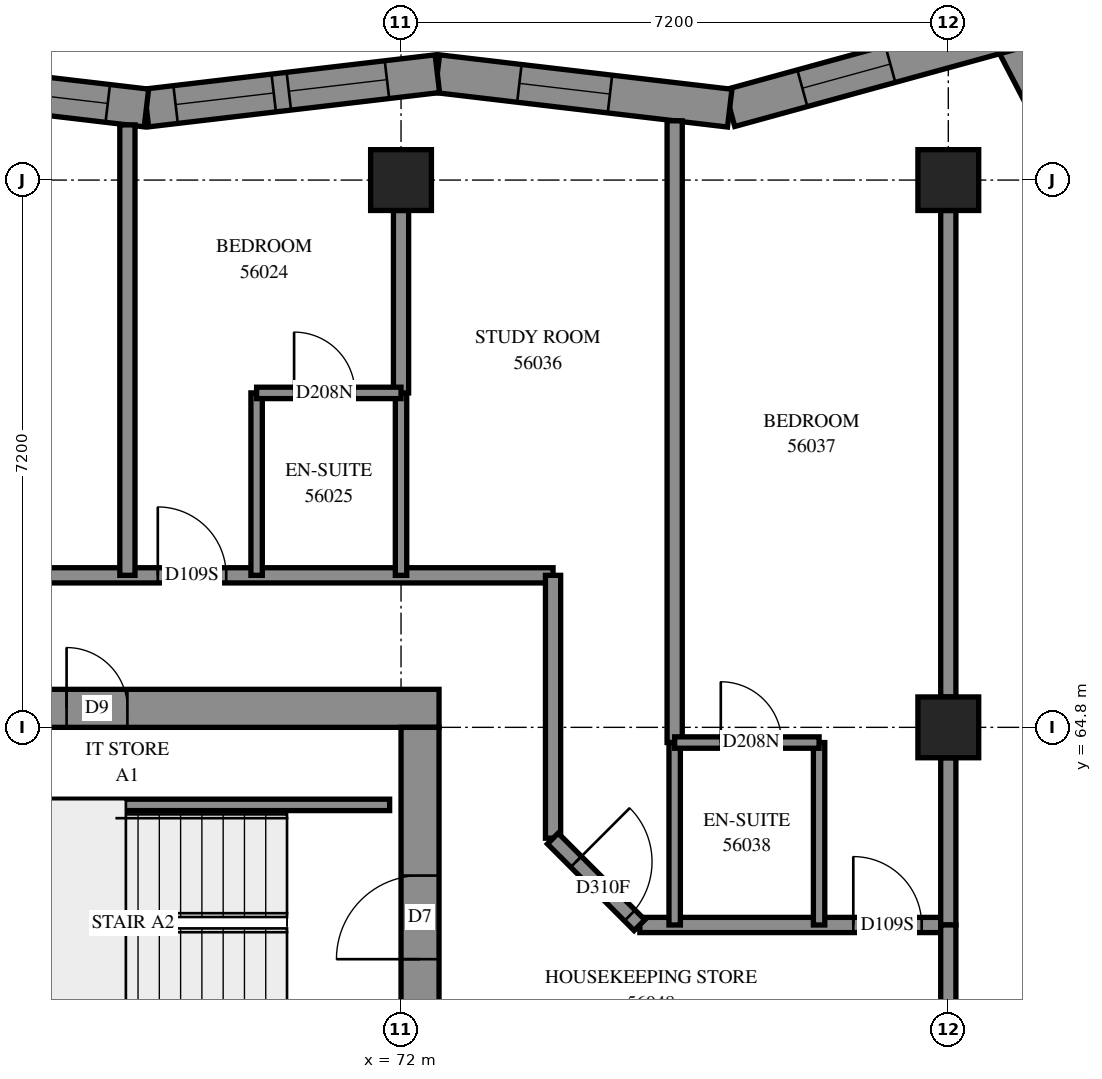
"""IFC4 building model, lengths in metres.
Left out: names, types, materials, properties, quantities, classifications, styles, units other than length and angle.
Written with IfcOpenShell. Run it as: python <this file> out.ifc"""

import sys

from ifc_helpers import new_model, si_unit, direction, frame, frame_2d, origin, origin_2d, place, context, subcontext, project, spatial, polyline, rectangle, outline, extrude, element, fill, save


model = new_model("IFC4")
c1 = context("Model", 3, precision=1e-05, world=origin(), true_north=direction((0.0, 1.0)))
c2 = subcontext(c1, "Body", "Model", "MODEL_VIEW")
j1 = project(units=[si_unit("LENGTHUNIT", "METRE"), si_unit("PLANEANGLEUNIT", "RADIAN")], contexts=[c1])
p1 = place(None, origin())
s1 = spatial("IfcSite", under=j1, at=p1, CompositionType="ELEMENT")
p2 = place(p1, origin())
s2 = spatial("IfcBuilding", under=s1, at=p2, CompositionType="ELEMENT")
p3 = place(p2, frame((0.0, 0.0, 206.6)))
s3 = spatial("IfcBuildingStorey", under=s2, at=p3, CompositionType="ELEMENT", Elevation=206.6)
for number, where, z_axis, x_axis in (
    (1, (72.0, 72.0, 0.0), (0.0, 0.0, 1.0), (1.0, 0.0, 0.0)),
    (2, (79.2, 64.8, 0.0), (0.0, 0.0, 1.0), (1.0, 0.0, 0.0)),
    (3, (79.2, 72.0, 0.0), (0.0, 0.0, 1.0), (1.0, 0.0, 0.0)),
):
    element("IfcColumn", number, at=place(p3, frame(where, z_axis=z_axis, x_axis=x_axis)), inside=s3, PredefinedType="COLUMN", context=c2, shape_type="SweptSolid", body=[
        extrude(rectangle(XDim=0.8, YDim=0.8, at=origin_2d()), origin(), (0.0, 0.0, 1.0), 3.1),
    ])
p4 = place(p3, frame((57.1, 65.05, -0.3), z_axis=(0.0, 0.0, 1.0), x_axis=(1.0, 0.0, 0.0)))
e4 = element("IfcWall", 4, at=p4, inside=s3, PredefinedType="SHEAR", context=c2, shape_type="SweptSolid", body=[
    extrude(rectangle(XDim=15.4, YDim=0.5, at=frame_2d((7.7, 0.0))), origin(), (0.0, 0.0, 1.0), 2.7),
])
p5 = place(p4, frame((10.5, 0.0, 0.3)))
e5 = element("IfcOpeningElement", 5, at=p5, cuts=e4, PredefinedType="OPENING", context=c2, shape_type="SweptSolid", body=[
    extrude(rectangle(XDim=0.8, YDim=2.1, at=frame_2d((0.4, 1.05))), frame((0.0, 0.26, 0.0), z_axis=(0.0, -1.0, 0.0), x_axis=(1.0, 0.0, 0.0)), (0.0, 0.0, 1.0), 0.52),
])
p6 = place(p3, frame((72.25, 50.4, -0.3), z_axis=(0.0, 0.0, 1.0), x_axis=(0.0, 1.0, 0.0)))
e6 = element("IfcWall", 6, at=p6, inside=s3, PredefinedType="SHEAR", context=c2, shape_type="SweptSolid", body=[
    extrude(rectangle(XDim=14.4, YDim=0.5, at=frame_2d((7.2, 0.0))), origin(), (0.0, 0.0, 1.0), 2.7),
])
p7 = place(p6, frame((4.55, 0.0, 0.3)))
e7 = element("IfcOpeningElement", 7, at=p7, cuts=e6, PredefinedType="OPENING", context=c2, shape_type="SweptSolid", body=[
    extrude(rectangle(XDim=1.1, YDim=2.1, at=frame_2d((0.55, 1.05))), frame((0.0, 0.26, 0.0), z_axis=(0.0, -1.0, 0.0), x_axis=(1.0, 0.0, 0.0)), (0.0, 0.0, 1.0), 0.52),
])
p8 = place(p6, frame((11.35, 0.0, 0.3)))
e8 = element("IfcOpeningElement", 8, at=p8, cuts=e6, PredefinedType="OPENING", context=c2, shape_type="SweptSolid", body=[
    extrude(rectangle(XDim=1.1, YDim=2.1, at=frame_2d((0.55, 1.05))), frame((0.0, 0.26, 0.0), z_axis=(0.0, -1.0, 0.0), x_axis=(1.0, 0.0, 0.0)), (0.0, 0.0, 1.0), 0.52),
])
p9 = place(p3, frame((81.55, 70.986, 0.0), z_axis=(0.0, 0.0, 1.0), x_axis=(-0.4617494401, 0.8870104027, 0.0)))
e9 = element("IfcWall", 9, at=p9, inside=s3, PredefinedType="SOLIDWALL", context=c2, shape_type="SweptSolid", body=[
    extrude(outline(polyline([(0.056, -0.25), (3.551, -0.25), (3.147, 0.25), (-0.056, 0.25), (0.056, -0.25)])), origin(), (0.0, 0.0, 1.0), 3.1),
])
p10 = place(p9, frame((0.747, 0.0, 0.45)))
e10 = element("IfcOpeningElement", 10, at=p10, cuts=e9, PredefinedType="OPENING", context=c2, shape_type="SweptSolid", body=[
    extrude(rectangle(XDim=1.2, YDim=2.5, at=frame_2d((0.6, 1.25))), frame((0.0, 0.26, 0.0), z_axis=(0.0, -1.0, 0.0), x_axis=(1.0, 0.0, 0.0)), (0.0, 0.0, 1.0), 0.52),
])
p11 = place(p3, frame((80.004, 73.957, 0.0), z_axis=(0.0, 0.0, 1.0), x_axis=(-0.9643003028, -0.2648111139, 0.0)))
e11 = element("IfcWall", 11, at=p11, inside=s3, PredefinedType="SOLIDWALL", context=c2, shape_type="SweptSolid", body=[
    extrude(outline(polyline([(-0.202, -0.25), (3.767, -0.25), (3.865, 0.25), (0.202, 0.25), (-0.202, -0.25)])), origin(), (0.0, 0.0, 1.0), 3.1),
])
p12 = place(p11, frame((1.625, 0.0, 0.45)))
e12 = element("IfcOpeningElement", 12, at=p12, cuts=e11, PredefinedType="OPENING", context=c2, shape_type="SweptSolid", body=[
    extrude(rectangle(XDim=1.2, YDim=2.5, at=frame_2d((0.6, 1.25))), frame((0.0, 0.26, 0.0), z_axis=(0.0, -1.0, 0.0), x_axis=(1.0, 0.0, 0.0)), (0.0, 0.0, 1.0), 0.52),
])
p13 = place(p3, frame((76.324, 72.946, 0.0), z_axis=(0.0, 0.0, 1.0), x_axis=(-0.9931274976, 0.1170374872, 0.0)))
e13 = element("IfcWall", 13, at=p13, inside=s3, PredefinedType="SOLIDWALL", context=c2, shape_type="SweptSolid", body=[
    extrude(outline(polyline([(0.049, -0.25), (3.903, -0.25), (3.844, 0.25), (-0.049, 0.25), (0.049, -0.25)])), origin(), (0.0, 0.0, 1.0), 3.1),
])
p14 = place(p13, frame((1.587, 0.0, 0.45)))
e14 = element("IfcOpeningElement", 14, at=p14, cuts=e13, PredefinedType="OPENING", context=c2, shape_type="SweptSolid", body=[
    extrude(rectangle(XDim=1.2, YDim=2.5, at=frame_2d((0.6, 1.25))), frame((0.0, 0.26, 0.0), z_axis=(0.0, -1.0, 0.0), x_axis=(1.0, 0.0, 0.0)), (0.0, 0.0, 1.0), 0.52),
])
p15 = place(p3, frame((72.478, 73.399, 0.0), z_axis=(0.0, 0.0, 1.0), x_axis=(-0.9931289789, -0.1170249176, 0.0)))
e15 = element("IfcWall", 15, at=p15, inside=s3, PredefinedType="SOLIDWALL", context=c2, shape_type="SweptSolid", body=[
    extrude(outline(polyline([(-0.029, -0.25), (3.824, -0.25), (3.883, 0.25), (0.029, 0.25), (-0.029, -0.25)])), origin(), (0.0, 0.0, 1.0), 3.1),
])
p16 = place(p15, frame((0.667, 0.0, 0.45)))
e16 = element("IfcOpeningElement", 16, at=p16, cuts=e15, PredefinedType="OPENING", context=c2, shape_type="SweptSolid", body=[
    extrude(rectangle(XDim=1.3, YDim=2.5, at=frame_2d((0.65, 1.25))), frame((0.0, 0.26, 0.0), z_axis=(0.0, -1.0, 0.0), x_axis=(1.0, 0.0, 0.0)), (0.0, 0.0, 1.0), 0.52),
])
p17 = place(p15, frame((2.167, 0.0, 0.45)))
e17 = element("IfcOpeningElement", 17, at=p17, cuts=e15, PredefinedType="OPENING", context=c2, shape_type="SweptSolid", body=[
    extrude(rectangle(XDim=1.3, YDim=2.5, at=frame_2d((0.65, 1.25))), frame((0.0, 0.26, 0.0), z_axis=(0.0, -1.0, 0.0), x_axis=(1.0, 0.0, 0.0)), (0.0, 0.0, 1.0), 0.52),
])
p18 = place(p3, frame((68.65, 72.948, 0.0), z_axis=(0.0, 0.0, 1.0), x_axis=(-0.9931289789, 0.1170249176, 0.0)))
e18 = element("IfcWall", 18, at=p18, inside=s3, PredefinedType="SOLIDWALL", context=c2, shape_type="SweptSolid", body=[
    extrude(outline(polyline([(0.029, -0.25), (3.883, -0.25), (3.824, 0.25), (-0.029, 0.25), (0.029, -0.25)])), origin(), (0.0, 0.0, 1.0), 3.1),
])
p19 = place(p18, frame((0.512, 0.0, 0.45)))
e19 = element("IfcOpeningElement", 19, at=p19, cuts=e18, PredefinedType="OPENING", context=c2, shape_type="SweptSolid", body=[
    extrude(rectangle(XDim=1.3, YDim=2.5, at=frame_2d((0.65, 1.25))), frame((0.0, 0.26, 0.0), z_axis=(0.0, -1.0, 0.0), x_axis=(1.0, 0.0, 0.0)), (0.0, 0.0, 1.0), 0.52),
])
p20 = place(p18, frame((2.012, 0.0, 0.45)))
e20 = element("IfcOpeningElement", 20, at=p20, cuts=e18, PredefinedType="OPENING", context=c2, shape_type="SweptSolid", body=[
    extrude(rectangle(XDim=1.3, YDim=2.5, at=frame_2d((0.65, 1.25))), frame((0.0, 0.26, 0.0), z_axis=(0.0, -1.0, 0.0), x_axis=(1.0, 0.0, 0.0)), (0.0, 0.0, 1.0), 0.52),
])
p21 = place(p3, frame((64.95, 63.78, 0.0), z_axis=(0.0, 0.0, 1.0), x_axis=(1.0, 0.0, 0.0)))
e21 = element("IfcWall", 21, at=p21, inside=s3, PredefinedType="PARTITIONING", context=c2, shape_type="SweptSolid", body=[
    extrude(rectangle(XDim=6.9, YDim=0.15, at=frame_2d((3.45, 0.0))), origin(), (0.0, 0.0, 1.0), 3.1),
])
p22 = place(p3, frame((55.6, 66.8, 0.0), z_axis=(0.0, 0.0, 1.0), x_axis=(1.0, 0.0, 0.0)))
e22 = element("IfcWall", 22, at=p22, inside=s3, PredefinedType="PARTITIONING", context=c2, shape_type="SweptSolid", body=[
    extrude(rectangle(XDim=18.4, YDim=0.2, at=frame_2d((9.2, 0.0))), origin(), (0.0, 0.0, 1.0), 3.1),
])
p23 = place(p22, frame((4.25, 0.0, 0.0)))
e23 = element("IfcOpeningElement", 23, at=p23, cuts=e22, PredefinedType="OPENING", context=c2, shape_type="SweptSolid", body=[
    extrude(rectangle(XDim=0.9, YDim=2.1, at=frame_2d((0.45, 1.05))), frame((0.0, 0.11, 0.0), z_axis=(0.0, -1.0, 0.0), x_axis=(1.0, 0.0, 0.0)), (0.0, 0.0, 1.0), 0.22),
])
p24 = place(p22, frame((7.974, 0.0, 0.0)))
e24 = element("IfcOpeningElement", 24, at=p24, cuts=e22, PredefinedType="OPENING", context=c2, shape_type="SweptSolid", body=[
    extrude(rectangle(XDim=1.0, YDim=2.1, at=frame_2d((0.5, 1.05))), frame((0.0, 0.11, 0.0), z_axis=(0.0, -1.0, 0.0), x_axis=(1.0, 0.0, 0.0)), (0.0, 0.0, 1.0), 0.22),
])
p25 = place(p22, frame((13.2, 0.0, 0.0)))
e25 = element("IfcOpeningElement", 25, at=p25, cuts=e22, PredefinedType="OPENING", context=c2, shape_type="SweptSolid", body=[
    extrude(rectangle(XDim=0.9, YDim=2.1, at=frame_2d((0.45, 1.05))), frame((0.0, 0.11, 0.0), z_axis=(0.0, -1.0, 0.0), x_axis=(1.0, 0.0, 0.0)), (0.0, 0.0, 1.0), 0.22),
])
p26 = place(p3, frame((75.6, 64.6, 0.0), z_axis=(0.0, 0.0, 1.0), x_axis=(0.0, 1.0, 0.0)))
e26 = element("IfcWall", 26, at=p26, inside=s3, PredefinedType="PARTITIONING", context=c2, shape_type="SweptSolid", body=[
    extrude(rectangle(XDim=8.18, YDim=0.2, at=frame_2d((4.09, 0.0))), origin(), (0.0, 0.0, 1.0), 3.1),
])
p27 = place(p3, frame((79.2, 65.2, 0.0), z_axis=(0.0, 0.0, 1.0), x_axis=(0.0, 1.0, 0.0)))
e27 = element("IfcWall", 27, at=p27, inside=s3, PredefinedType="PARTITIONING", context=c2, shape_type="SweptSolid", body=[
    extrude(rectangle(XDim=6.4, YDim=0.2, at=frame_2d((3.2, 0.0))), origin(), (0.0, 0.0, 1.0), 3.1),
])
p28 = place(p3, frame((68.4, 66.8, 0.0), z_axis=(0.0, 0.0, 1.0), x_axis=(0.0, 1.0, 0.0)))
e28 = element("IfcWall", 28, at=p28, inside=s3, PredefinedType="PARTITIONING", context=c2, shape_type="SweptSolid", body=[
    extrude(rectangle(XDim=5.926, YDim=0.2, at=frame_2d((2.963, 0.0))), origin(), (0.0, 0.0, 1.0), 3.1),
])
p29 = place(p3, frame((75.142, 62.2, 0.0), z_axis=(0.0, 0.0, 1.0), x_axis=(1.0, 0.0, 0.0)))
e29 = element("IfcWall", 29, at=p29, inside=s3, PredefinedType="PARTITIONING", context=c2, shape_type="SweptSolid", body=[
    extrude(rectangle(XDim=4.058, YDim=0.2, at=frame_2d((2.029, 0.0))), origin(), (0.0, 0.0, 1.0), 3.1),
])
p30 = place(p29, frame((2.808, 0.0, 0.0)))
e30 = element("IfcOpeningElement", 30, at=p30, cuts=e29, PredefinedType="OPENING", context=c2, shape_type="SweptSolid", body=[
    extrude(rectangle(XDim=0.9, YDim=2.1, at=frame_2d((0.45, 1.05))), frame((0.0, 0.11, 0.0), z_axis=(0.0, -1.0, 0.0), x_axis=(1.0, 0.0, 0.0)), (0.0, 0.0, 1.0), 0.22),
])
p31 = place(p3, frame((74.0, 63.342, 0.0), z_axis=(0.0, 0.0, 1.0), x_axis=(0.0, 1.0, 0.0)))
e31 = element("IfcWall", 31, at=p31, inside=s3, PredefinedType="PARTITIONING", context=c2, shape_type="SweptSolid", body=[
    extrude(rectangle(XDim=3.458, YDim=0.2, at=frame_2d((1.729, 0.0))), origin(), (0.0, 0.0, 1.0), 3.1),
])
for number, where, z_axis, x_axis in (
    (32, (70.1, 66.8, 0.0), (0.0, 0.0, 1.0), (0.0, 1.0, 0.0)),
    (33, (72.0, 66.8, 0.0), (0.0, 0.0, 1.0), (0.0, 1.0, 0.0)),
):
    element("IfcWall", number, at=place(p3, frame(where, z_axis=z_axis, x_axis=x_axis)), inside=s3, PredefinedType="PARTITIONING", context=c2, shape_type="SweptSolid", body=[
        extrude(rectangle(XDim=2.4, YDim=0.15, at=frame_2d((1.2, 0.0))), origin(), (0.0, 0.0, 1.0), 3.1),
    ])
p32 = place(p3, frame((72.0, 69.2, 0.0), z_axis=(0.0, 0.0, 1.0), x_axis=(0.0, 1.0, 0.0)))
e34 = element("IfcWall", 34, at=p32, inside=s3, PredefinedType="PARTITIONING", context=c2, shape_type="SweptSolid", body=[
    extrude(rectangle(XDim=2.4, YDim=0.2, at=frame_2d((1.2, 0.0))), origin(), (0.0, 0.0, 1.0), 3.1),
])
for number, where, z_axis, x_axis in (
    (35, (75.6, 62.2, 0.0), (0.0, 0.0, 1.0), (0.0, 1.0, 0.0)),
    (36, (77.5, 62.2, 0.0), (0.0, 0.0, 1.0), (0.0, 1.0, 0.0)),
):
    element("IfcWall", number, at=place(p3, frame(where, z_axis=z_axis, x_axis=x_axis)), inside=s3, PredefinedType="PARTITIONING", context=c2, shape_type="SweptSolid", body=[
        extrude(rectangle(XDim=2.4, YDim=0.15, at=frame_2d((1.2, 0.0))), origin(), (0.0, 0.0, 1.0), 3.1),
    ])
p33 = place(p3, frame((79.2, 62.2, 0.0), z_axis=(0.0, 0.0, 1.0), x_axis=(0.0, 1.0, 0.0)))
e37 = element("IfcWall", 37, at=p33, inside=s3, PredefinedType="PARTITIONING", context=c2, shape_type="SweptSolid", body=[
    extrude(rectangle(XDim=2.2, YDim=0.2, at=frame_2d((1.1, 0.0))), origin(), (0.0, 0.0, 1.0), 3.1),
])
p34 = place(p3, frame((79.2, 60.2, 0.0), z_axis=(0.0, 0.0, 1.0), x_axis=(0.0, 1.0, 0.0)))
e38 = element("IfcWall", 38, at=p34, inside=s3, PredefinedType="PARTITIONING", context=c2, shape_type="SweptSolid", body=[
    extrude(rectangle(XDim=2.0, YDim=0.2, at=frame_2d((1.0, 0.0))), origin(), (0.0, 0.0, 1.0), 3.1),
])
p35 = place(p3, frame((75.6, 64.6, 0.0), z_axis=(0.0, 0.0, 1.0), x_axis=(1.0, 0.0, 0.0)))
e39 = element("IfcWall", 39, at=p35, inside=s3, PredefinedType="PARTITIONING", context=c2, shape_type="SweptSolid", body=[
    extrude(rectangle(XDim=1.9, YDim=0.15, at=frame_2d((0.95, 0.0))), origin(), (0.0, 0.0, 1.0), 3.1),
])
p36 = place(p35, frame((0.607, 0.0, 0.0)))
e40 = element("IfcOpeningElement", 40, at=p36, cuts=e39, PredefinedType="OPENING", context=c2, shape_type="SweptSolid", body=[
    extrude(rectangle(XDim=0.8, YDim=2.1, at=frame_2d((0.4, 1.05))), frame((0.0, 0.085, 0.0), z_axis=(0.0, -1.0, 0.0), x_axis=(1.0, 0.0, 0.0)), (0.0, 0.0, 1.0), 0.17),
])
p37 = place(p3, frame((70.1, 69.2, 0.0), z_axis=(0.0, 0.0, 1.0), x_axis=(1.0, 0.0, 0.0)))
e41 = element("IfcWall", 41, at=p37, inside=s3, PredefinedType="PARTITIONING", context=c2, shape_type="SweptSolid", body=[
    extrude(rectangle(XDim=1.9, YDim=0.15, at=frame_2d((0.95, 0.0))), origin(), (0.0, 0.0, 1.0), 3.1),
])
p38 = place(p37, frame((0.493, 0.0, 0.0)))
e42 = element("IfcOpeningElement", 42, at=p38, cuts=e41, PredefinedType="OPENING", context=c2, shape_type="SweptSolid", body=[
    extrude(rectangle(XDim=0.8, YDim=2.1, at=frame_2d((0.4, 1.05))), frame((0.0, 0.085, 0.0), z_axis=(0.0, -1.0, 0.0), x_axis=(1.0, 0.0, 0.0)), (0.0, 0.0, 1.0), 0.17),
])
p39 = place(p3, frame((73.997, 63.337, 0.0), z_axis=(0.0, 0.0, 1.0), x_axis=(0.7071067812, -0.7071067812, 0.0)))
e43 = element("IfcWall", 43, at=p39, inside=s3, PredefinedType="PARTITIONING", context=c2, shape_type="SweptSolid", body=[
    extrude(rectangle(XDim=1.612, YDim=0.2, at=frame_2d((0.806, 0.0))), origin(), (0.0, 0.0, 1.0), 3.1),
])
p40 = place(p39, frame((0.432, 0.0, 0.0)))
e44 = element("IfcOpeningElement", 44, at=p40, cuts=e43, PredefinedType="OPENING", context=c2, shape_type="SweptSolid", body=[
    extrude(rectangle(XDim=1.0, YDim=2.1, at=frame_2d((0.5, 1.05))), frame((0.0, 0.11, 0.0), z_axis=(0.0, -1.0, 0.0), x_axis=(1.0, 0.0, 0.0)), (0.0, 0.0, 1.0), 0.22),
])
p41 = place(p12, origin())
e45 = element("IfcWindow", 45, at=p41, inside=s3, PartitioningType="SINGLE_PANEL", PredefinedType="WINDOW", context=c2, shape_type="SweptSolid", body=[
    extrude(rectangle(XDim=1.2, YDim=2.5, at=frame_2d((0.6, 1.25))), frame((0.0, 0.18, 0.0), z_axis=(0.0, -1.0, 0.0), x_axis=(1.0, 0.0, 0.0)), (0.0, 0.0, 1.0), 0.06),
])
fill(e12, e45)
p42 = place(p14, origin())
e46 = element("IfcWindow", 46, at=p42, inside=s3, PartitioningType="SINGLE_PANEL", PredefinedType="WINDOW", context=c2, shape_type="SweptSolid", body=[
    extrude(rectangle(XDim=1.2, YDim=2.5, at=frame_2d((0.6, 1.25))), frame((0.0, 0.18, 0.0), z_axis=(0.0, -1.0, 0.0), x_axis=(1.0, 0.0, 0.0)), (0.0, 0.0, 1.0), 0.06),
])
fill(e14, e46)
p43 = place(p16, origin())
e47 = element("IfcWindow", 47, at=p43, inside=s3, PartitioningType="SINGLE_PANEL", PredefinedType="WINDOW", context=c2, shape_type="SweptSolid", body=[
    extrude(rectangle(XDim=1.3, YDim=2.5, at=frame_2d((0.65, 1.25))), frame((0.0, 0.18, 0.0), z_axis=(0.0, -1.0, 0.0), x_axis=(1.0, 0.0, 0.0)), (0.0, 0.0, 1.0), 0.06),
])
fill(e16, e47)
p44 = place(p17, origin())
e48 = element("IfcWindow", 48, at=p44, inside=s3, PartitioningType="SINGLE_PANEL", PredefinedType="WINDOW", context=c2, shape_type="SweptSolid", body=[
    extrude(rectangle(XDim=1.3, YDim=2.5, at=frame_2d((0.65, 1.25))), frame((0.0, 0.18, 0.0), z_axis=(0.0, -1.0, 0.0), x_axis=(1.0, 0.0, 0.0)), (0.0, 0.0, 1.0), 0.06),
])
fill(e17, e48)
p45 = place(p19, origin())
e49 = element("IfcWindow", 49, at=p45, inside=s3, PartitioningType="SINGLE_PANEL", PredefinedType="WINDOW", context=c2, shape_type="SweptSolid", body=[
    extrude(rectangle(XDim=1.3, YDim=2.5, at=frame_2d((0.65, 1.25))), frame((0.0, 0.18, 0.0), z_axis=(0.0, -1.0, 0.0), x_axis=(1.0, 0.0, 0.0)), (0.0, 0.0, 1.0), 0.06),
])
fill(e19, e49)
p46 = place(p5, origin())
e50 = element("IfcDoor", 50, at=p46, inside=s3, OperationType="SINGLE_SWING_RIGHT", PredefinedType="DOOR", context=c2, shape_type="SweptSolid", body=[
    extrude(rectangle(XDim=0.8, YDim=2.1, at=frame_2d((0.4, 1.05))), frame((0.0, 0.025, 0.0), z_axis=(0.0, -1.0, 0.0), x_axis=(1.0, 0.0, 0.0)), (0.0, 0.0, 1.0), 0.05),
])
fill(e5, e50)
p47 = place(p8, origin())
e51 = element("IfcDoor", 51, at=p47, inside=s3, OperationType="SINGLE_SWING_RIGHT", PredefinedType="DOOR", context=c2, shape_type="SweptSolid", body=[
    extrude(rectangle(XDim=1.1, YDim=2.1, at=frame_2d((0.55, 1.05))), frame((0.0, 0.025, 0.0), z_axis=(0.0, -1.0, 0.0), x_axis=(1.0, 0.0, 0.0)), (0.0, 0.0, 1.0), 0.05),
])
fill(e8, e51)
p48 = place(p25, origin())
e52 = element("IfcDoor", 52, at=p48, inside=s3, OperationType="SINGLE_SWING_LEFT", PredefinedType="DOOR", context=c2, shape_type="SweptSolid", body=[
    extrude(rectangle(XDim=0.9, YDim=2.1, at=frame_2d((0.45, 1.05))), frame((0.0, 0.025, 0.0), z_axis=(0.0, -1.0, 0.0), x_axis=(1.0, 0.0, 0.0)), (0.0, 0.0, 1.0), 0.05),
])
fill(e25, e52)
p49 = place(p38, origin())
e53 = element("IfcDoor", 53, at=p49, inside=s3, OperationType="SINGLE_SWING_RIGHT", PredefinedType="DOOR", context=c2, shape_type="SweptSolid", body=[
    extrude(rectangle(XDim=0.8, YDim=2.1, at=frame_2d((0.4, 1.05))), frame((0.0, 0.025, 0.0), z_axis=(0.0, -1.0, 0.0), x_axis=(1.0, 0.0, 0.0)), (0.0, 0.0, 1.0), 0.05),
])
fill(e42, e53)
p50 = place(p40, origin())
e54 = element("IfcDoor", 54, at=p50, inside=s3, OperationType="SINGLE_SWING_RIGHT", PredefinedType="DOOR", context=c2, shape_type="SweptSolid", body=[
    extrude(rectangle(XDim=1.0, YDim=2.1, at=frame_2d((0.5, 1.05))), frame((0.0, 0.025, 0.0), z_axis=(0.0, -1.0, 0.0), x_axis=(1.0, 0.0, 0.0)), (0.0, 0.0, 1.0), 0.05),
])
fill(e44, e54)
p51 = place(p30, origin())
e55 = element("IfcDoor", 55, at=p51, inside=s3, OperationType="SINGLE_SWING_LEFT", PredefinedType="DOOR", context=c2, shape_type="SweptSolid", body=[
    extrude(rectangle(XDim=0.9, YDim=2.1, at=frame_2d((0.45, 1.05))), frame((0.0, 0.025, 0.0), z_axis=(0.0, -1.0, 0.0), x_axis=(1.0, 0.0, 0.0)), (0.0, 0.0, 1.0), 0.05),
])
fill(e30, e55)
p52 = place(p36, origin())
e56 = element("IfcDoor", 56, at=p52, inside=s3, OperationType="SINGLE_SWING_RIGHT", PredefinedType="DOOR", context=c2, shape_type="SweptSolid", body=[
    extrude(rectangle(XDim=0.8, YDim=2.1, at=frame_2d((0.4, 1.05))), frame((0.0, 0.025, 0.0), z_axis=(0.0, -1.0, 0.0), x_axis=(1.0, 0.0, 0.0)), (0.0, 0.0, 1.0), 0.05),
])
fill(e40, e56)
save(model, sys.argv[1])
